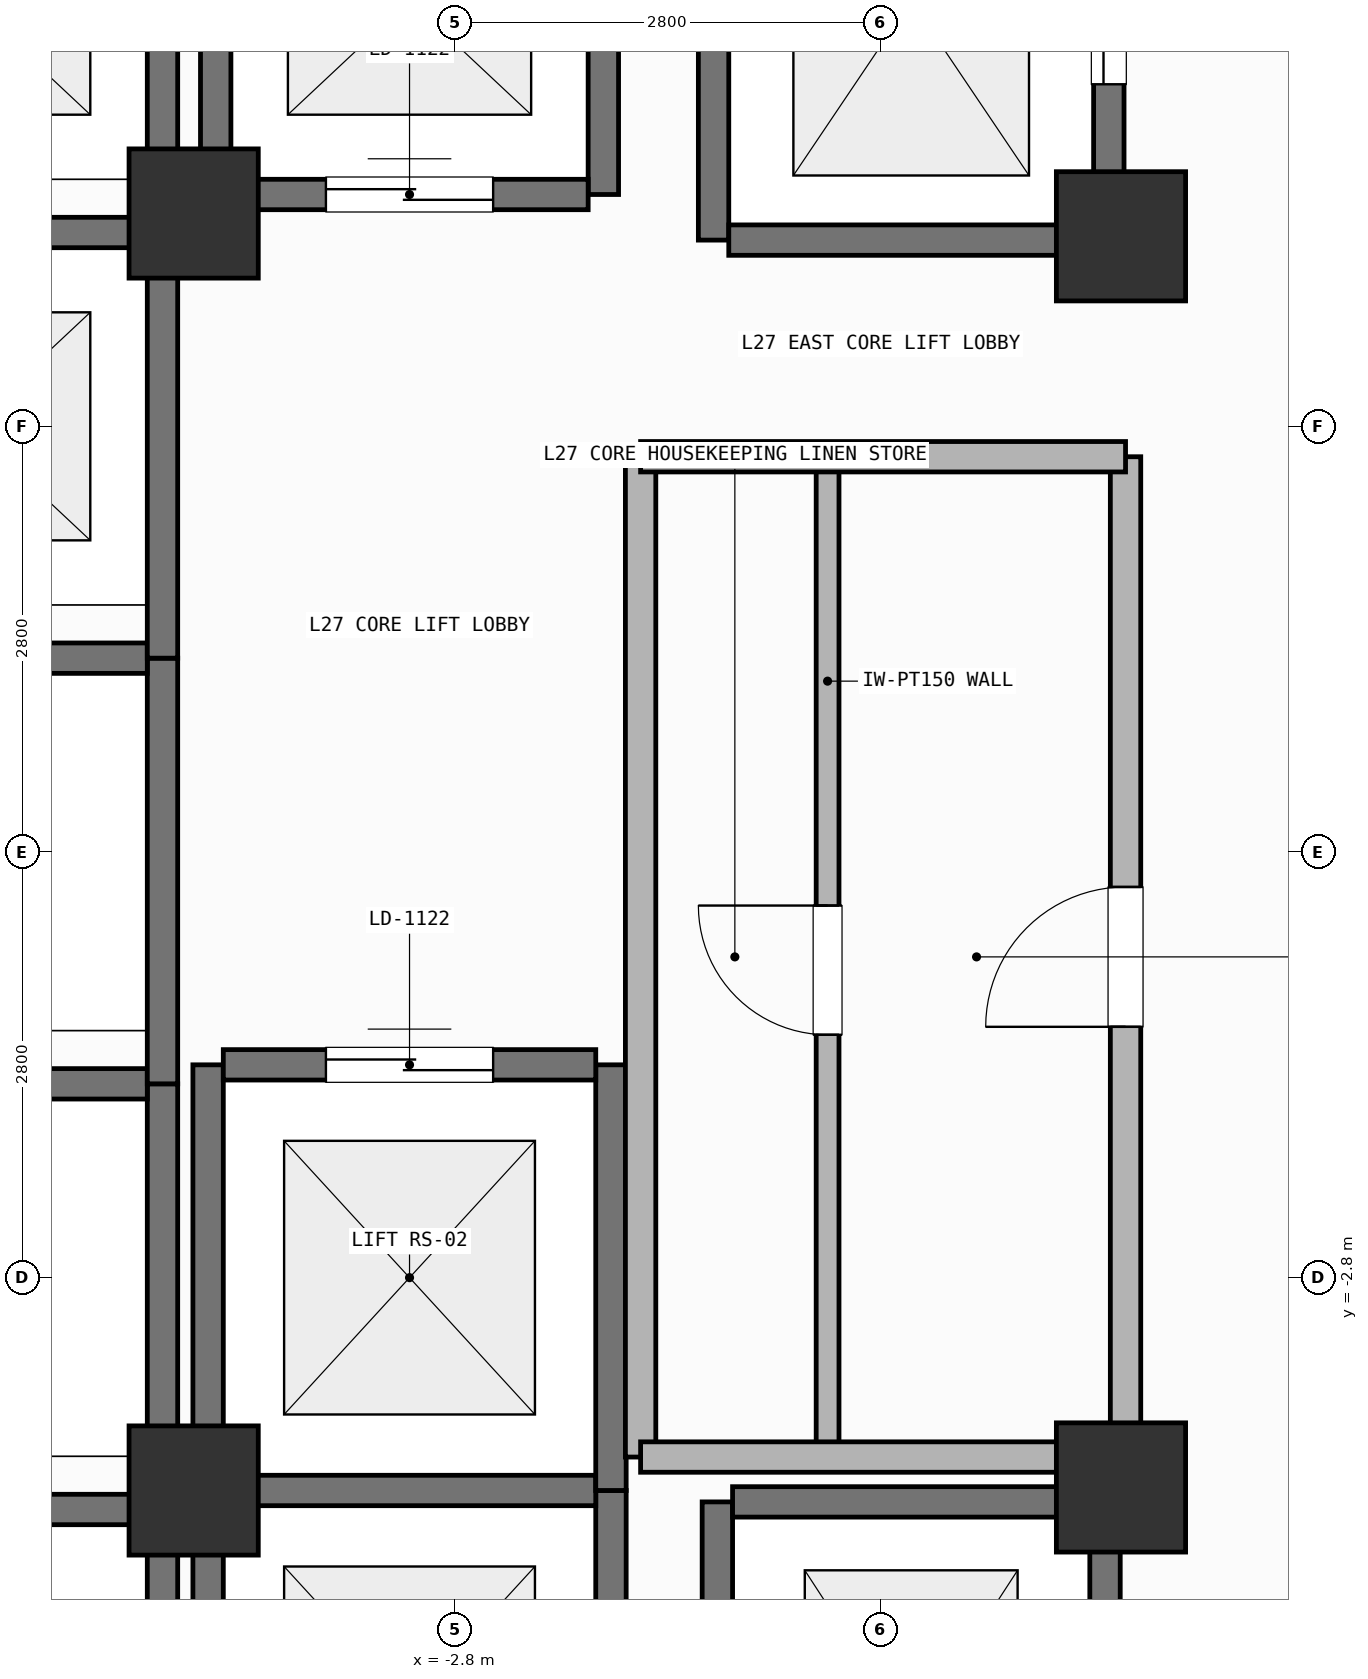
"""IFC4 building model, lengths in metres.
Left out: names, types, materials, properties, quantities, classifications, styles, units other than length and angle.
Written with IfcOpenShell. Run it as: python <this file> out.ifc"""

import sys

from ifc_helpers import new_model, si_unit, direction, frame, frame_2d, origin, origin_2d, place, context, subcontext, project, spatial, rectangle, extrude, element, fill, save


model = new_model("IFC4")
c1 = context("Model", 3, precision=1e-05, world=origin(), true_north=direction((0.0, 1.0)))
c2 = subcontext(c1, "Body", "Model", "MODEL_VIEW")
j1 = project(units=[si_unit("LENGTHUNIT", "METRE"), si_unit("PLANEANGLEUNIT", "RADIAN")], contexts=[c1])
p1 = place(None, origin())
s1 = spatial("IfcSite", under=j1, at=p1, CompositionType="ELEMENT")
p2 = place(p1, origin())
s2 = spatial("IfcBuilding", under=s1, at=p2, CompositionType="ELEMENT")
p3 = place(p2, frame((0.0, 0.0, 108.6)))
s3 = spatial("IfcBuildingStorey", under=s2, at=p3, CompositionType="ELEMENT", Elevation=108.6)
for number, where, z_axis, x_axis in (
    (1, (-4.52, -4.2, 0.0), (0.0, 0.0, 1.0), (1.0, 0.0, 0.0)),
    (2, (1.58, -4.18, 0.0), (0.0, 0.0, 1.0), (1.0, 0.0, 0.0)),
    (3, (1.58, 4.05, 0.0), (0.0, 0.0, 1.0), (1.0, 0.0, 0.0)),
    (4, (-4.52, 4.2, 0.0), (0.0, 0.0, 1.0), (1.0, 0.0, 0.0)),
):
    element("IfcColumn", number, at=place(p3, frame(where, z_axis=z_axis, x_axis=x_axis)), inside=s3, PredefinedType="COLUMN", context=c2, shape_type="SweptSolid", body=[
        extrude(rectangle(XDim=0.85, YDim=0.85, at=origin_2d()), origin(), (0.0, 0.0, 1.0), 4.8),
    ])
p4 = place(p3, frame((-4.725, -6.875, 0.0), z_axis=(0.0, 0.0, 1.0), x_axis=(0.0, 1.0, 0.0)))
e5 = element("IfcWall", 5, at=p4, inside=s3, PredefinedType="SHEAR", context=c2, shape_type="SweptSolid", body=[
    extrude(rectangle(XDim=2.55, YDim=0.2, at=frame_2d((1.275, 0.0))), origin(), (0.0, 0.0, 1.0), 4.58),
])
p5 = place(p3, frame((-7.175, -4.325, 0.0), z_axis=(0.0, 0.0, 1.0), x_axis=(1.0, 0.0, 0.0)))
e6 = element("IfcWall", 6, at=p5, inside=s3, PredefinedType="SHEAR", context=c2, shape_type="SweptSolid", body=[
    extrude(rectangle(XDim=2.35, YDim=0.2, at=frame_2d((1.175, 0.0))), origin(), (0.0, 0.0, 1.0), 4.58),
])
p6 = place(p3, frame((-4.725, -4.325, 0.0), z_axis=(0.0, 0.0, 1.0), x_axis=(0.0, 1.0, 0.0)))
e7 = element("IfcWall", 7, at=p6, inside=s3, PredefinedType="SHEAR", context=c2, shape_type="SweptSolid", body=[
    extrude(rectangle(XDim=2.8, YDim=0.2, at=frame_2d((1.4, 0.0))), origin(), (0.0, 0.0, 1.0), 4.58),
])
p7 = place(p3, frame((-7.175, -1.525, 0.0), z_axis=(0.0, 0.0, 1.0), x_axis=(1.0, 0.0, 0.0)))
e8 = element("IfcWall", 8, at=p7, inside=s3, PredefinedType="SHEAR", context=c2, shape_type="SweptSolid", body=[
    extrude(rectangle(XDim=2.35, YDim=0.2, at=frame_2d((1.175, 0.0))), origin(), (0.0, 0.0, 1.0), 4.58),
])
p8 = place(p3, frame((-4.725, -1.525, 0.0), z_axis=(0.0, 0.0, 1.0), x_axis=(0.0, 1.0, 0.0)))
e9 = element("IfcWall", 9, at=p8, inside=s3, PredefinedType="SHEAR", context=c2, shape_type="SweptSolid", body=[
    extrude(rectangle(XDim=2.8, YDim=0.2, at=frame_2d((1.4, 0.0))), origin(), (0.0, 0.0, 1.0), 4.58),
])
p9 = place(p3, frame((-7.175, 1.275, 0.0), z_axis=(0.0, 0.0, 1.0), x_axis=(1.0, 0.0, 0.0)))
e10 = element("IfcWall", 10, at=p9, inside=s3, PredefinedType="SHEAR", context=c2, shape_type="SweptSolid", body=[
    extrude(rectangle(XDim=2.35, YDim=0.2, at=frame_2d((1.175, 0.0))), origin(), (0.0, 0.0, 1.0), 4.58),
])
p10 = place(p3, frame((-4.725, 1.275, 0.0), z_axis=(0.0, 0.0, 1.0), x_axis=(0.0, 1.0, 0.0)))
e11 = element("IfcWall", 11, at=p10, inside=s3, PredefinedType="SHEAR", context=c2, shape_type="SweptSolid", body=[
    extrude(rectangle(XDim=2.8, YDim=0.2, at=frame_2d((1.4, 0.0))), origin(), (0.0, 0.0, 1.0), 4.58),
])
p11 = place(p3, frame((-7.175, 4.075, 0.0), z_axis=(0.0, 0.0, 1.0), x_axis=(1.0, 0.0, 0.0)))
e12 = element("IfcWall", 12, at=p11, inside=s3, PredefinedType="SHEAR", context=c2, shape_type="SweptSolid", body=[
    extrude(rectangle(XDim=2.35, YDim=0.2, at=frame_2d((1.175, 0.0))), origin(), (0.0, 0.0, 1.0), 4.58),
])
p12 = place(p3, frame((-4.725, 4.075, 0.0), z_axis=(0.0, 0.0, 1.0), x_axis=(0.0, 1.0, 0.0)))
e13 = element("IfcWall", 13, at=p12, inside=s3, PredefinedType="SHEAR", context=c2, shape_type="SweptSolid", body=[
    extrude(rectangle(XDim=2.8, YDim=0.2, at=frame_2d((1.4, 0.0))), origin(), (0.0, 0.0, 1.0), 4.58),
])
for number, where, z_axis, x_axis in (
    (14, (-4.375, 4.325, 0.0), (0.0, 0.0, 1.0), (0.0, 1.0, 0.0)),
    (15, (-1.825, 4.325, 0.0), (0.0, 0.0, 1.0), (0.0, 1.0, 0.0)),
):
    element("IfcWall", number, at=place(p3, frame(where, z_axis=z_axis, x_axis=x_axis)), inside=s3, PredefinedType="SHEAR", context=c2, shape_type="SweptSolid", body=[
        extrude(rectangle(XDim=2.55, YDim=0.2, at=frame_2d((1.275, 0.0))), origin(), (0.0, 0.0, 1.0), 4.58),
    ])
p13 = place(p3, frame((-4.275, 4.325, 0.0), z_axis=(0.0, 0.0, 1.0), x_axis=(1.0, 0.0, 0.0)))
e16 = element("IfcWall", 16, at=p13, inside=s3, PredefinedType="SHEAR", context=c2, shape_type="SweptSolid", body=[
    extrude(rectangle(XDim=2.35, YDim=0.2, at=frame_2d((1.175, 0.0))), origin(), (0.0, 0.0, 1.0), 4.58),
])
p14 = place(p13, frame((0.625, 0.0, 0.0)))
e17 = element("IfcOpeningElement", 17, at=p14, cuts=e16, PredefinedType="OPENING", context=c2, shape_type="SweptSolid", body=[
    extrude(rectangle(XDim=1.1, YDim=2.2, at=frame_2d((0.55, 1.1))), frame((0.0, 0.11, 0.0), z_axis=(0.0, -1.0, 0.0), x_axis=(1.0, 0.0, 0.0)), (0.0, 0.0, 1.0), 0.22),
])
for number, where, z_axis, x_axis in (
    (18, (-4.425, -7.0, 0.0), (0.0, 0.0, 1.0), (0.0, 1.0, 0.0)),
    (19, (-1.775, -7.0, 0.0), (0.0, 0.0, 1.0), (0.0, 1.0, 0.0)),
):
    element("IfcWall", number, at=place(p3, frame(where, z_axis=z_axis, x_axis=x_axis)), inside=s3, PredefinedType="SHEAR", context=c2, shape_type="SweptSolid", body=[
        extrude(rectangle(XDim=2.8, YDim=0.2, at=frame_2d((1.4, 0.0))), origin(), (0.0, 0.0, 1.0), 4.58),
    ])
p15 = place(p3, frame((-4.325, -4.2, 0.0), z_axis=(0.0, 0.0, 1.0), x_axis=(1.0, 0.0, 0.0)))
e20 = element("IfcWall", 20, at=p15, inside=s3, PredefinedType="SHEAR", context=c2, shape_type="SweptSolid", body=[
    extrude(rectangle(XDim=2.45, YDim=0.2, at=frame_2d((1.225, 0.0))), origin(), (0.0, 0.0, 1.0), 4.58),
])
for number, where, z_axis, x_axis in (
    (21, (-4.425, -4.2, 0.0), (0.0, 0.0, 1.0), (0.0, 1.0, 0.0)),
    (22, (-1.775, -4.2, 0.0), (0.0, 0.0, 1.0), (0.0, 1.0, 0.0)),
):
    element("IfcWall", number, at=place(p3, frame(where, z_axis=z_axis, x_axis=x_axis)), inside=s3, PredefinedType="SHEAR", context=c2, shape_type="SweptSolid", body=[
        extrude(rectangle(XDim=2.8, YDim=0.2, at=frame_2d((1.4, 0.0))), origin(), (0.0, 0.0, 1.0), 4.58),
    ])
p16 = place(p3, frame((-4.325, -1.4, 0.0), z_axis=(0.0, 0.0, 1.0), x_axis=(1.0, 0.0, 0.0)))
e23 = element("IfcWall", 23, at=p16, inside=s3, PredefinedType="SHEAR", context=c2, shape_type="SweptSolid", body=[
    extrude(rectangle(XDim=2.45, YDim=0.2, at=frame_2d((1.225, 0.0))), origin(), (0.0, 0.0, 1.0), 4.58),
])
p17 = place(p16, frame((0.675, 0.0, 0.0)))
e24 = element("IfcOpeningElement", 24, at=p17, cuts=e23, PredefinedType="OPENING", context=c2, shape_type="SweptSolid", body=[
    extrude(rectangle(XDim=1.1, YDim=2.2, at=frame_2d((0.55, 1.1))), frame((0.0, 0.11, 0.0), z_axis=(0.0, -1.0, 0.0), x_axis=(1.0, 0.0, 0.0)), (0.0, 0.0, 1.0), 0.22),
])
p18 = place(p3, frame((-1.1, 4.025, 0.0), z_axis=(0.0, 0.0, 1.0), x_axis=(0.0, 1.0, 0.0)))
e25 = element("IfcWall", 25, at=p18, inside=s3, PredefinedType="SHEAR", context=c2, shape_type="SweptSolid", body=[
    extrude(rectangle(XDim=3.15, YDim=0.2, at=frame_2d((1.575, 0.0))), origin(), (0.0, 0.0, 1.0), 4.58),
])
p19 = place(p3, frame((1.5, 4.025, 0.0), z_axis=(0.0, 0.0, 1.0), x_axis=(0.0, 1.0, 0.0)))
e26 = element("IfcWall", 26, at=p19, inside=s3, PredefinedType="SHEAR", context=c2, shape_type="SweptSolid", body=[
    extrude(rectangle(XDim=3.15, YDim=0.2, at=frame_2d((1.575, 0.0))), origin(), (0.0, 0.0, 1.0), 4.58),
])
p20 = place(p19, frame((1.025, 0.0, 0.0)))
e27 = element("IfcOpeningElement", 27, at=p20, cuts=e26, PredefinedType="OPENING", context=c2, shape_type="SweptSolid", body=[
    extrude(rectangle(XDim=1.1, YDim=2.2, at=frame_2d((0.55, 1.1))), frame((0.0, 0.11, 0.0), z_axis=(0.0, -1.0, 0.0), x_axis=(1.0, 0.0, 0.0)), (0.0, 0.0, 1.0), 0.22),
])
p21 = place(p3, frame((-1.0, 4.025, 0.0), z_axis=(0.0, 0.0, 1.0), x_axis=(1.0, 0.0, 0.0)))
e28 = element("IfcWall", 28, at=p21, inside=s3, PredefinedType="SHEAR", context=c2, shape_type="SweptSolid", body=[
    extrude(rectangle(XDim=2.4, YDim=0.2, at=frame_2d((1.2, 0.0))), origin(), (0.0, 0.0, 1.0), 4.58),
])
p22 = place(p3, frame((-1.075, -7.925, 0.0), z_axis=(0.0, 0.0, 1.0), x_axis=(0.0, 1.0, 0.0)))
e29 = element("IfcWall", 29, at=p22, inside=s3, PredefinedType="SHEAR", context=c2, shape_type="SweptSolid", body=[
    extrude(rectangle(XDim=3.65, YDim=0.2, at=frame_2d((1.825, 0.0))), origin(), (0.0, 0.0, 1.0), 4.58),
])
p23 = place(p3, frame((1.475, -7.925, 0.0), z_axis=(0.0, 0.0, 1.0), x_axis=(0.0, 1.0, 0.0)))
e30 = element("IfcWall", 30, at=p23, inside=s3, PredefinedType="SHEAR", context=c2, shape_type="SweptSolid", body=[
    extrude(rectangle(XDim=3.65, YDim=0.2, at=frame_2d((1.825, 0.0))), origin(), (0.0, 0.0, 1.0), 4.58),
])
p24 = place(p23, frame((1.575, 0.0, 0.0)))
e31 = element("IfcOpeningElement", 31, at=p24, cuts=e30, PredefinedType="OPENING", context=c2, shape_type="SweptSolid", body=[
    extrude(rectangle(XDim=1.1, YDim=2.2, at=frame_2d((0.55, 1.1))), frame((0.0, 0.11, 0.0), z_axis=(0.0, -1.0, 0.0), x_axis=(1.0, 0.0, 0.0)), (0.0, 0.0, 1.0), 0.22),
])
p25 = place(p3, frame((-0.975, -4.275, 0.0), z_axis=(0.0, 0.0, 1.0), x_axis=(1.0, 0.0, 0.0)))
e32 = element("IfcWall", 32, at=p25, inside=s3, PredefinedType="SHEAR", context=c2, shape_type="SweptSolid", body=[
    extrude(rectangle(XDim=2.35, YDim=0.2, at=frame_2d((1.175, 0.0))), origin(), (0.0, 0.0, 1.0), 4.58),
])
p26 = place(p3, frame((-0.35, -3.98, 0.0), z_axis=(0.0, 0.0, 1.0), x_axis=(0.0, 1.0, 0.0)))
e33 = element("IfcWall", 33, at=p26, inside=s3, PredefinedType="PARTITIONING", context=c2, shape_type="SweptSolid", body=[
    extrude(rectangle(XDim=6.58, YDim=0.15, at=frame_2d((3.29, 0.0))), origin(), (0.0, 0.0, 1.0), 4.58),
])
p27 = place(p26, frame((2.778, 0.0, 0.0)))
e34 = element("IfcOpeningElement", 34, at=p27, cuts=e33, PredefinedType="OPENING", context=c2, shape_type="SweptSolid", body=[
    extrude(rectangle(XDim=0.85, YDim=2.1, at=frame_2d((0.425, 1.05))), frame((0.0, 0.085, 0.0), z_axis=(0.0, -1.0, 0.0), x_axis=(1.0, 0.0, 0.0)), (0.0, 0.0, 1.0), 0.17),
])
p28 = place(p3, frame((1.61, -3.98, 0.0), z_axis=(0.0, 0.0, 1.0), x_axis=(0.0, 1.0, 0.0)))
e35 = element("IfcWall", 35, at=p28, inside=s3, PredefinedType="SOLIDWALL", context=c2, shape_type="SweptSolid", body=[
    extrude(rectangle(XDim=6.58, YDim=0.2, at=frame_2d((3.29, 0.0))), origin(), (0.0, 0.0, 1.0), 4.58),
])
p29 = place(p28, frame((2.83, 0.0, 0.0)))
e36 = element("IfcOpeningElement", 36, at=p29, cuts=e35, PredefinedType="OPENING", context=c2, shape_type="SweptSolid", body=[
    extrude(rectangle(XDim=0.92, YDim=2.1, at=frame_2d((0.46, 1.05))), frame((0.0, 0.11, 0.0), z_axis=(0.0, -1.0, 0.0), x_axis=(1.0, 0.0, 0.0)), (0.0, 0.0, 1.0), 0.22),
])
p30 = place(p3, frame((-1.58, -3.98, 0.0), z_axis=(0.0, 0.0, 1.0), x_axis=(0.0, 1.0, 0.0)))
e37 = element("IfcWall", 37, at=p30, inside=s3, PredefinedType="SOLIDWALL", context=c2, shape_type="SweptSolid", body=[
    extrude(rectangle(XDim=6.58, YDim=0.2, at=frame_2d((3.29, 0.0))), origin(), (0.0, 0.0, 1.0), 4.58),
])
for number, where, z_axis, x_axis in (
    (38, (-1.58, -3.98, 0.0), (0.0, 0.0, 1.0), (1.0, 0.0, 0.0)),
    (39, (-1.58, 2.6, 0.0), (0.0, 0.0, 1.0), (1.0, 0.0, 0.0)),
):
    element("IfcWall", number, at=place(p3, frame(where, z_axis=z_axis, x_axis=x_axis)), inside=s3, PredefinedType="SOLIDWALL", context=c2, shape_type="SweptSolid", body=[
        extrude(rectangle(XDim=3.19, YDim=0.2, at=frame_2d((1.595, 0.0))), origin(), (0.0, 0.0, 1.0), 4.58),
    ])
p31 = place(p14, origin())
e40 = element("IfcDoor", 40, at=p31, inside=s3, OperationType="SLIDING_TO_LEFT", PredefinedType="DOOR", context=c2, shape_type="SweptSolid", body=[
    extrude(rectangle(XDim=1.1, YDim=2.2, at=frame_2d((0.55, 1.1))), frame((0.0, 0.025, 0.0), z_axis=(0.0, -1.0, 0.0), x_axis=(1.0, 0.0, 0.0)), (0.0, 0.0, 1.0), 0.05),
])
fill(e17, e40)
p32 = place(p17, origin())
e41 = element("IfcDoor", 41, at=p32, inside=s3, OperationType="SLIDING_TO_LEFT", PredefinedType="DOOR", context=c2, shape_type="SweptSolid", body=[
    extrude(rectangle(XDim=1.1, YDim=2.2, at=frame_2d((0.55, 1.1))), frame((0.0, 0.025, 0.0), z_axis=(0.0, -1.0, 0.0), x_axis=(1.0, 0.0, 0.0)), (0.0, 0.0, 1.0), 0.05),
])
fill(e24, e41)
p33 = place(p20, origin())
e42 = element("IfcDoor", 42, at=p33, inside=s3, OperationType="SLIDING_TO_LEFT", PredefinedType="DOOR", context=c2, shape_type="SweptSolid", body=[
    extrude(rectangle(XDim=1.1, YDim=2.2, at=frame_2d((0.55, 1.1))), frame((0.0, 0.025, 0.0), z_axis=(0.0, -1.0, 0.0), x_axis=(1.0, 0.0, 0.0)), (0.0, 0.0, 1.0), 0.05),
])
fill(e27, e42)
p34 = place(p27, origin())
e43 = element("IfcDoor", 43, at=p34, inside=s3, OperationType="SINGLE_SWING_RIGHT", PredefinedType="DOOR", context=c2, shape_type="SweptSolid", body=[
    extrude(rectangle(XDim=0.85, YDim=2.1, at=frame_2d((0.425, 1.05))), frame((0.0, 0.025, 0.0), z_axis=(0.0, -1.0, 0.0), x_axis=(1.0, 0.0, 0.0)), (0.0, 0.0, 1.0), 0.05),
])
fill(e34, e43)
p35 = place(p29, origin())
e44 = element("IfcDoor", 44, at=p35, inside=s3, OperationType="SINGLE_SWING_LEFT", PredefinedType="DOOR", context=c2, shape_type="SweptSolid", body=[
    extrude(rectangle(XDim=0.92, YDim=2.1, at=frame_2d((0.46, 1.05))), frame((0.0, 0.025, 0.0), z_axis=(0.0, -1.0, 0.0), x_axis=(1.0, 0.0, 0.0)), (0.0, 0.0, 1.0), 0.05),
])
fill(e36, e44)
save(model, sys.argv[1])
